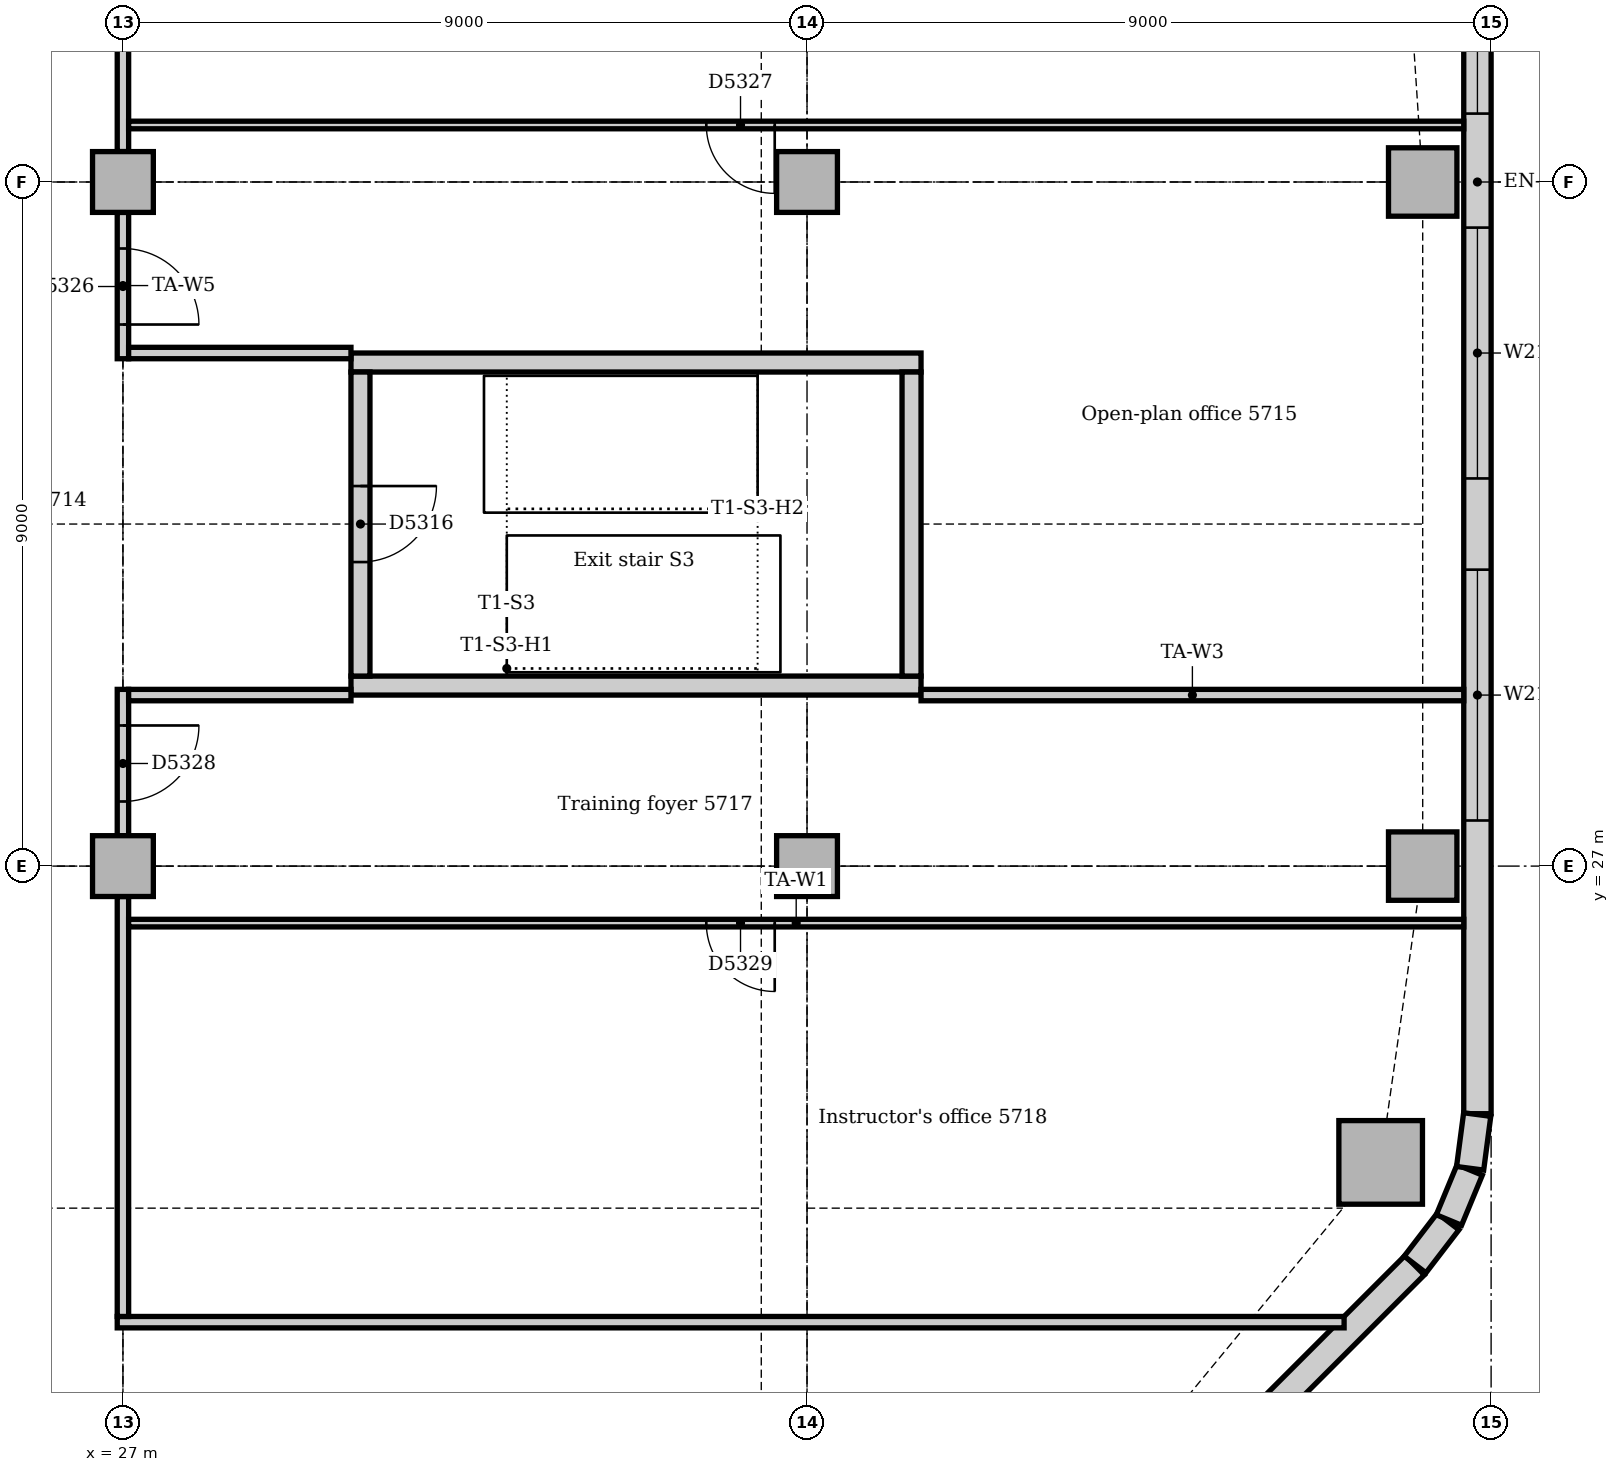
"""IFC4 building model, lengths in metres.
Left out: names, types, materials, properties, quantities, classifications, styles, units other than length and angle.
Written with IfcOpenShell. Run it as: python <this file> out.ifc"""

import sys

from ifc_helpers import new_model, si_unit, direction, frame, frame_2d, origin, origin_2d, place, context, subcontext, project, spatial, rectangle, extrude, element, fill, save


model = new_model("IFC4")
c1 = context("Model", 3, precision=1e-05, world=origin(), true_north=direction((0.0, 1.0)))
c2 = subcontext(c1, "Body", "Model", "MODEL_VIEW")
j1 = project(units=[si_unit("LENGTHUNIT", "METRE"), si_unit("PLANEANGLEUNIT", "RADIAN")], contexts=[c1])
p1 = place(None, origin())
s1 = spatial("IfcSite", under=j1, at=p1, CompositionType="ELEMENT")
p2 = place(p1, origin())
s2 = spatial("IfcBuilding", under=s1, at=p2, CompositionType="ELEMENT")
p3 = place(p2, frame((0.0, 0.0, 238.0)))
s3 = spatial("IfcBuildingStorey", under=s2, at=p3, CompositionType="ELEMENT", Elevation=238.0)
for number, where, z_axis, x_axis in (
    (1, (30.0, 29.375, 0.0), (0.0, 0.0, 1.0), (1.0, 0.0, 0.0)),
    (2, (37.5, 33.625, 0.0), (0.0, 0.0, 1.0), (-1.0, 0.0, 0.0)),
):
    element("IfcWall", number, at=place(p3, frame(where, z_axis=z_axis, x_axis=x_axis)), inside=s3, PredefinedType="SOLIDWALL", context=c2, shape_type="SweptSolid", body=[
        extrude(rectangle(XDim=7.5, YDim=0.25, at=frame_2d((3.75, 0.0))), origin(), (0.0, 0.0, 1.0), 4.0),
    ])
p4 = place(p3, frame((37.375, 29.5, 0.0), z_axis=(0.0, 0.0, 1.0), x_axis=(0.0, 1.0, 0.0)))
e3 = element("IfcWall", 3, at=p4, inside=s3, PredefinedType="SOLIDWALL", context=c2, shape_type="SweptSolid", body=[
    extrude(rectangle(XDim=4.0, YDim=0.25, at=frame_2d((2.0, 0.0))), origin(), (0.0, 0.0, 1.0), 4.0),
])
p5 = place(p3, frame((30.125, 33.5, 0.0), z_axis=(0.0, 0.0, 1.0), x_axis=(0.0, -1.0, 0.0)))
e4 = element("IfcWall", 4, at=p5, inside=s3, PredefinedType="SOLIDWALL", context=c2, shape_type="SweptSolid", body=[
    extrude(rectangle(XDim=4.0, YDim=0.25, at=frame_2d((2.0, 0.0))), origin(), (0.0, 0.0, 1.0), 4.0),
])
p6 = place(p5, frame((1.5, 0.0, 0.0)))
e5 = element("IfcOpeningElement", 5, at=p6, cuts=e4, PredefinedType="OPENING", context=c2, shape_type="SweptSolid", body=[
    extrude(rectangle(XDim=1.0, YDim=2.1, at=frame_2d((0.5, 1.05))), frame((0.0, 0.135, 0.0), z_axis=(0.0, -1.0, 0.0), x_axis=(1.0, 0.0, 0.0)), (0.0, 0.0, 1.0), 0.27),
])
p7 = place(p3, frame((43.547, 23.102, 0.0), z_axis=(0.0, 0.0, 1.0), x_axis=(1.0, 0.0, 0.0)))
e6 = element("IfcColumn", 6, at=p7, inside=s3, PredefinedType="COLUMN", context=c2, shape_type="SweptSolid", body=[
    extrude(rectangle(XDim=1.1, YDim=1.1, at=origin_2d()), origin(), (0.0, 0.0, 1.0), 3.7),
])
for number, where, z_axis, x_axis in (
    (7, (44.1, 27.0, 0.0), (0.0, 0.0, 1.0), (1.0, 0.0, 0.0)),
    (8, (44.1, 36.0, 0.0), (0.0, 0.0, 1.0), (1.0, 0.0, 0.0)),
):
    element("IfcColumn", number, at=place(p3, frame(where, z_axis=z_axis, x_axis=x_axis)), inside=s3, PredefinedType="COLUMN", context=c2, shape_type="SweptSolid", body=[
        extrude(rectangle(XDim=0.9, YDim=0.9, at=origin_2d()), origin(), (0.0, 0.0, 1.0), 3.7),
    ])
for number, where, z_axis, x_axis in (
    (9, (27.0, 27.0, 0.0), (0.0, 0.0, 1.0), (1.0, 0.0, 0.0)),
    (10, (27.0, 36.0, 0.0), (0.0, 0.0, 1.0), (1.0, 0.0, 0.0)),
    (11, (36.0, 27.0, 0.0), (0.0, 0.0, 1.0), (1.0, 0.0, 0.0)),
    (12, (36.0, 36.0, 0.0), (0.0, 0.0, 1.0), (1.0, 0.0, 0.0)),
):
    element("IfcColumn", number, at=place(p3, frame(where, z_axis=z_axis, x_axis=x_axis)), inside=s3, PredefinedType="COLUMN", context=c2, shape_type="SweptSolid", body=[
        extrude(rectangle(XDim=0.8, YDim=0.8, at=origin_2d()), origin(), (0.0, 0.0, 1.0), 3.7),
    ])
p8 = place(p3, frame((36.751, 14.506, 0.0), z_axis=(0.0, 0.0, 1.0), x_axis=(0.707106781187, 0.707106781187, 0.0)))
e13 = element("IfcWall", 13, at=p8, inside=s3, PredefinedType="STANDARD", context=c2, shape_type="SweptSolid", body=[
    extrude(rectangle(XDim=10.243, YDim=0.36, at=frame_2d((5.121, 0.0))), origin(), (0.0, 0.0, 1.0), 3.7),
])
p9 = place(p8, frame((5.021, 0.0, 0.9)))
e14 = element("IfcOpeningElement", 14, at=p9, cuts=e13, PredefinedType="OPENING", context=c2, shape_type="SweptSolid", body=[
    extrude(rectangle(XDim=1.8, YDim=1.6, at=frame_2d((0.9, 0.8))), frame((0.0, 0.19, 0.0), z_axis=(0.0, -1.0, 0.0), x_axis=(1.0, 0.0, 0.0)), (0.0, 0.0, 1.0), 0.38),
])
p10 = place(p3, frame((44.82, 23.743, 0.0), z_axis=(0.0, 0.0, 1.0), x_axis=(0.0, 1.0, 0.0)))
e15 = element("IfcWall", 15, at=p10, inside=s3, PredefinedType="STANDARD", context=c2, shape_type="SweptSolid", body=[
    extrude(rectangle(XDim=24.515, YDim=0.36, at=frame_2d((12.257, 0.0))), origin(), (0.0, 0.0, 1.0), 3.7),
])
p11 = place(p10, frame((3.857, 0.0, 0.9)))
e16 = element("IfcOpeningElement", 16, at=p11, cuts=e15, PredefinedType="OPENING", context=c2, shape_type="SweptSolid", body=[
    extrude(rectangle(XDim=3.3, YDim=1.6, at=frame_2d((1.65, 0.8))), frame((0.0, 0.19, 0.0), z_axis=(0.0, -1.0, 0.0), x_axis=(1.0, 0.0, 0.0)), (0.0, 0.0, 1.0), 0.38),
])
p12 = place(p10, frame((8.357, 0.0, 0.9)))
e17 = element("IfcOpeningElement", 17, at=p12, cuts=e15, PredefinedType="OPENING", context=c2, shape_type="SweptSolid", body=[
    extrude(rectangle(XDim=3.3, YDim=1.6, at=frame_2d((1.65, 0.8))), frame((0.0, 0.19, 0.0), z_axis=(0.0, -1.0, 0.0), x_axis=(1.0, 0.0, 0.0)), (0.0, 0.0, 1.0), 0.38),
])
p13 = place(p10, frame((13.157, 0.0, 0.9)))
e18 = element("IfcOpeningElement", 18, at=p13, cuts=e15, PredefinedType="OPENING", context=c2, shape_type="SweptSolid", body=[
    extrude(rectangle(XDim=3.3, YDim=1.6, at=frame_2d((1.65, 0.8))), frame((0.0, 0.19, 0.0), z_axis=(0.0, -1.0, 0.0), x_axis=(1.0, 0.0, 0.0)), (0.0, 0.0, 1.0), 0.38),
])
p14 = place(p10, frame((17.357, 0.0, 0.9)))
e19 = element("IfcOpeningElement", 19, at=p14, cuts=e15, PredefinedType="OPENING", context=c2, shape_type="SweptSolid", body=[
    extrude(rectangle(XDim=3.3, YDim=1.6, at=frame_2d((1.65, 0.8))), frame((0.0, 0.19, 0.0), z_axis=(0.0, -1.0, 0.0), x_axis=(1.0, 0.0, 0.0)), (0.0, 0.0, 1.0), 0.38),
])
p15 = place(p3, frame((44.0, 21.759, 0.0), z_axis=(0.0, 0.0, 1.0), x_axis=(0.608802368033, 0.793321924995, 0.0)))
e20 = element("IfcWall", 20, at=p15, inside=s3, PredefinedType="STANDARD", context=c2, shape_type="SweptSolid", body=[
    extrude(rectangle(XDim=0.713, YDim=0.36, at=frame_2d((0.357, 0.0))), origin(), (0.0, 0.0, 1.0), 3.7),
])
for number, where, z_axis, x_axis in (
    (21, (44.445, 22.344, 0.0), (0.0, 0.0, 1.0), (0.383, 0.924, 0.0)),
    (22, (44.724, 23.024, 0.0), (0.0, 0.0, 1.0), (0.131, 0.991, 0.0)),
):
    element("IfcWall", number, at=place(p3, frame(where, z_axis=z_axis, x_axis=x_axis)), inside=s3, PredefinedType="STANDARD", context=c2, shape_type="SweptSolid", body=[
        extrude(rectangle(XDim=0.713, YDim=0.36, at=frame_2d((0.356, 0.0))), origin(), (0.0, 0.0, 1.0), 3.7),
    ])
p16 = place(p3, frame((26.925, 21.0, 0.0), z_axis=(0.0, 0.0, 1.0), x_axis=(1.0, 0.0, 0.0)))
e23 = element("IfcWall", 23, at=p16, inside=s3, PredefinedType="PARTITIONING", context=c2, shape_type="SweptSolid", body=[
    extrude(rectangle(XDim=16.141, YDim=0.15, at=frame_2d((8.07, 0.0))), origin(), (0.0, 0.0, 1.0), 3.7),
])
p17 = place(p3, frame((27.0, 33.675, 0.0), z_axis=(0.0, 0.0, 1.0), x_axis=(0.0, 1.0, 0.0)))
e24 = element("IfcWall", 24, at=p17, inside=s3, PredefinedType="PARTITIONING", context=c2, shape_type="SweptSolid", body=[
    extrude(rectangle(XDim=1.925, YDim=0.15, at=frame_2d((0.963, 0.0))), origin(), (0.0, 0.0, 1.0), 3.2),
])
p18 = place(p17, frame((0.45, 0.0, 0.0)))
e25 = element("IfcOpeningElement", 25, at=p18, cuts=e24, PredefinedType="OPENING", context=c2, shape_type="SweptSolid", body=[
    extrude(rectangle(XDim=1.0, YDim=2.1, at=frame_2d((0.5, 1.05))), frame((0.0, 0.085, 0.0), z_axis=(0.0, -1.0, 0.0), x_axis=(1.0, 0.0, 0.0)), (0.0, 0.0, 1.0), 0.17),
])
p19 = place(p3, frame((27.0, 36.4, 0.0), z_axis=(0.0, 0.0, 1.0), x_axis=(0.0, 1.0, 0.0)))
e26 = element("IfcWall", 26, at=p19, inside=s3, PredefinedType="PARTITIONING", context=c2, shape_type="SweptSolid", body=[
    extrude(rectangle(XDim=7.3, YDim=0.15, at=frame_2d((3.65, 0.0))), origin(), (0.0, 0.0, 1.0), 3.2),
])
p20 = place(p3, frame((27.0, 21.075, 0.0), z_axis=(0.0, 0.0, 1.0), x_axis=(0.0, 1.0, 0.0)))
e27 = element("IfcWall", 27, at=p20, inside=s3, PredefinedType="PARTITIONING", context=c2, shape_type="SweptSolid", body=[
    extrude(rectangle(XDim=5.525, YDim=0.15, at=frame_2d((2.763, 0.0))), origin(), (0.0, 0.0, 1.0), 3.2),
])
p21 = place(p3, frame((27.0, 27.4, 0.0), z_axis=(0.0, 0.0, 1.0), x_axis=(0.0, 1.0, 0.0)))
e28 = element("IfcWall", 28, at=p21, inside=s3, PredefinedType="PARTITIONING", context=c2, shape_type="SweptSolid", body=[
    extrude(rectangle(XDim=1.925, YDim=0.15, at=frame_2d((0.963, 0.0))), origin(), (0.0, 0.0, 1.0), 3.2),
])
p22 = place(p21, frame((0.45, 0.0, 0.0)))
e29 = element("IfcOpeningElement", 29, at=p22, cuts=e28, PredefinedType="OPENING", context=c2, shape_type="SweptSolid", body=[
    extrude(rectangle(XDim=1.0, YDim=2.1, at=frame_2d((0.5, 1.05))), frame((0.0, 0.085, 0.0), z_axis=(0.0, -1.0, 0.0), x_axis=(1.0, 0.0, 0.0)), (0.0, 0.0, 1.0), 0.17),
])
for number, where, z_axis, x_axis in (
    (30, (27.075, 29.25, 0.0), (0.0, 0.0, 1.0), (1.0, 0.0, 0.0)),
    (31, (27.075, 33.75, 0.0), (0.0, 0.0, 1.0), (1.0, 0.0, 0.0)),
):
    element("IfcWall", number, at=place(p3, frame(where, z_axis=z_axis, x_axis=x_axis)), inside=s3, PredefinedType="PARTITIONING", context=c2, shape_type="SweptSolid", body=[
        extrude(rectangle(XDim=2.925, YDim=0.15, at=frame_2d((1.462, 0.0))), origin(), (0.0, 0.0, 1.0), 3.7),
    ])
p23 = place(p3, frame((37.5, 29.25, 0.0), z_axis=(0.0, 0.0, 1.0), x_axis=(1.0, 0.0, 0.0)))
e32 = element("IfcWall", 32, at=p23, inside=s3, PredefinedType="PARTITIONING", context=c2, shape_type="SweptSolid", body=[
    extrude(rectangle(XDim=7.14, YDim=0.15, at=frame_2d((3.57, 0.0))), origin(), (0.0, 0.0, 1.0), 3.7),
])
p24 = place(p3, frame((27.075, 26.25, 0.0), z_axis=(0.0, 0.0, 1.0), x_axis=(1.0, 0.0, 0.0)))
e33 = element("IfcWall", 33, at=p24, inside=s3, PredefinedType="PARTITIONING", context=c2, shape_type="SweptSolid", body=[
    extrude(rectangle(XDim=17.565, YDim=0.1, at=frame_2d((8.783, 0.0))), origin(), (0.0, 0.0, 1.0), 3.7),
])
p25 = place(p24, frame((7.6, 0.0, 0.0)))
e34 = element("IfcOpeningElement", 34, at=p25, cuts=e33, PredefinedType="OPENING", context=c2, shape_type="SweptSolid", body=[
    extrude(rectangle(XDim=0.9, YDim=2.1, at=frame_2d((0.45, 1.05))), frame((0.0, 0.06, 0.0), z_axis=(0.0, -1.0, 0.0), x_axis=(1.0, 0.0, 0.0)), (0.0, 0.0, 1.0), 0.12),
])
p26 = place(p3, frame((27.075, 36.75, 0.0), z_axis=(0.0, 0.0, 1.0), x_axis=(1.0, 0.0, 0.0)))
e35 = element("IfcWall", 35, at=p26, inside=s3, PredefinedType="PARTITIONING", context=c2, shape_type="SweptSolid", body=[
    extrude(rectangle(XDim=17.565, YDim=0.1, at=frame_2d((8.783, 0.0))), origin(), (0.0, 0.0, 1.0), 3.7),
])
p27 = place(p26, frame((7.6, 0.0, 0.0)))
e36 = element("IfcOpeningElement", 36, at=p27, cuts=e35, PredefinedType="OPENING", context=c2, shape_type="SweptSolid", body=[
    extrude(rectangle(XDim=0.9, YDim=2.1, at=frame_2d((0.45, 1.05))), frame((0.0, 0.06, 0.0), z_axis=(0.0, -1.0, 0.0), x_axis=(1.0, 0.0, 0.0)), (0.0, 0.0, 1.0), 0.12),
])
p28 = place(p11, origin())
e37 = element("IfcWindow", 37, at=p28, inside=s3, PartitioningType="SINGLE_PANEL", PredefinedType="WINDOW", context=c2, shape_type="SweptSolid", body=[
    extrude(rectangle(XDim=3.3, YDim=1.6, at=frame_2d((1.65, 0.8))), frame((0.0, 0.13, 0.0), z_axis=(0.0, -1.0, 0.0), x_axis=(1.0, 0.0, 0.0)), (0.0, 0.0, 1.0), 0.06),
])
fill(e16, e37)
p29 = place(p12, origin())
e38 = element("IfcWindow", 38, at=p29, inside=s3, PartitioningType="SINGLE_PANEL", PredefinedType="WINDOW", context=c2, shape_type="SweptSolid", body=[
    extrude(rectangle(XDim=3.3, YDim=1.6, at=frame_2d((1.65, 0.8))), frame((0.0, 0.13, 0.0), z_axis=(0.0, -1.0, 0.0), x_axis=(1.0, 0.0, 0.0)), (0.0, 0.0, 1.0), 0.06),
])
fill(e17, e38)
p30 = place(p13, origin())
e39 = element("IfcWindow", 39, at=p30, inside=s3, PartitioningType="SINGLE_PANEL", PredefinedType="WINDOW", context=c2, shape_type="SweptSolid", body=[
    extrude(rectangle(XDim=3.3, YDim=1.6, at=frame_2d((1.65, 0.8))), frame((0.0, 0.13, 0.0), z_axis=(0.0, -1.0, 0.0), x_axis=(1.0, 0.0, 0.0)), (0.0, 0.0, 1.0), 0.06),
])
fill(e18, e39)
p31 = place(p6, origin())
e40 = element("IfcDoor", 40, at=p31, inside=s3, OperationType="SINGLE_SWING_LEFT", PredefinedType="DOOR", context=c2, shape_type="SweptSolid", body=[
    extrude(rectangle(XDim=1.0, YDim=2.1, at=frame_2d((0.5, 1.05))), frame((0.0, 0.025, 0.0), z_axis=(0.0, -1.0, 0.0), x_axis=(1.0, 0.0, 0.0)), (0.0, 0.0, 1.0), 0.05),
])
fill(e5, e40)
p32 = place(p18, frame((1.0, 0.0, 0.0), z_axis=(0.0, 0.0, 1.0), x_axis=(-1.0, 0.0, 0.0)))
e41 = element("IfcDoor", 41, at=p32, inside=s3, OperationType="SINGLE_SWING_RIGHT", PredefinedType="DOOR", context=c2, shape_type="SweptSolid", body=[
    extrude(rectangle(XDim=1.0, YDim=2.1, at=frame_2d((0.5, 1.05))), frame((0.0, 0.025, 0.0), z_axis=(0.0, -1.0, 0.0), x_axis=(1.0, 0.0, 0.0)), (0.0, 0.0, 1.0), 0.05),
])
fill(e25, e41)
p33 = place(p27, frame((0.9, 0.0, 0.0), z_axis=(0.0, 0.0, 1.0), x_axis=(-1.0, 0.0, 0.0)))
e42 = element("IfcDoor", 42, at=p33, inside=s3, OperationType="SINGLE_SWING_LEFT", PredefinedType="DOOR", context=c2, shape_type="SweptSolid", body=[
    extrude(rectangle(XDim=0.9, YDim=2.1, at=frame_2d((0.45, 1.05))), frame((0.0, 0.025, 0.0), z_axis=(0.0, -1.0, 0.0), x_axis=(1.0, 0.0, 0.0)), (0.0, 0.0, 1.0), 0.05),
])
fill(e36, e42)
p34 = place(p22, frame((1.0, 0.0, 0.0), z_axis=(0.0, 0.0, 1.0), x_axis=(-1.0, 0.0, 0.0)))
e43 = element("IfcDoor", 43, at=p34, inside=s3, OperationType="SINGLE_SWING_LEFT", PredefinedType="DOOR", context=c2, shape_type="SweptSolid", body=[
    extrude(rectangle(XDim=1.0, YDim=2.1, at=frame_2d((0.5, 1.05))), frame((0.0, 0.025, 0.0), z_axis=(0.0, -1.0, 0.0), x_axis=(1.0, 0.0, 0.0)), (0.0, 0.0, 1.0), 0.05),
])
fill(e29, e43)
p35 = place(p25, frame((0.9, 0.0, 0.0), z_axis=(0.0, 0.0, 1.0), x_axis=(-1.0, 0.0, 0.0)))
e44 = element("IfcDoor", 44, at=p35, inside=s3, OperationType="SINGLE_SWING_LEFT", PredefinedType="DOOR", context=c2, shape_type="SweptSolid", body=[
    extrude(rectangle(XDim=0.9, YDim=2.1, at=frame_2d((0.45, 1.05))), frame((0.0, 0.025, 0.0), z_axis=(0.0, -1.0, 0.0), x_axis=(1.0, 0.0, 0.0)), (0.0, 0.0, 1.0), 0.05),
])
fill(e34, e44)
save(model, sys.argv[1])
